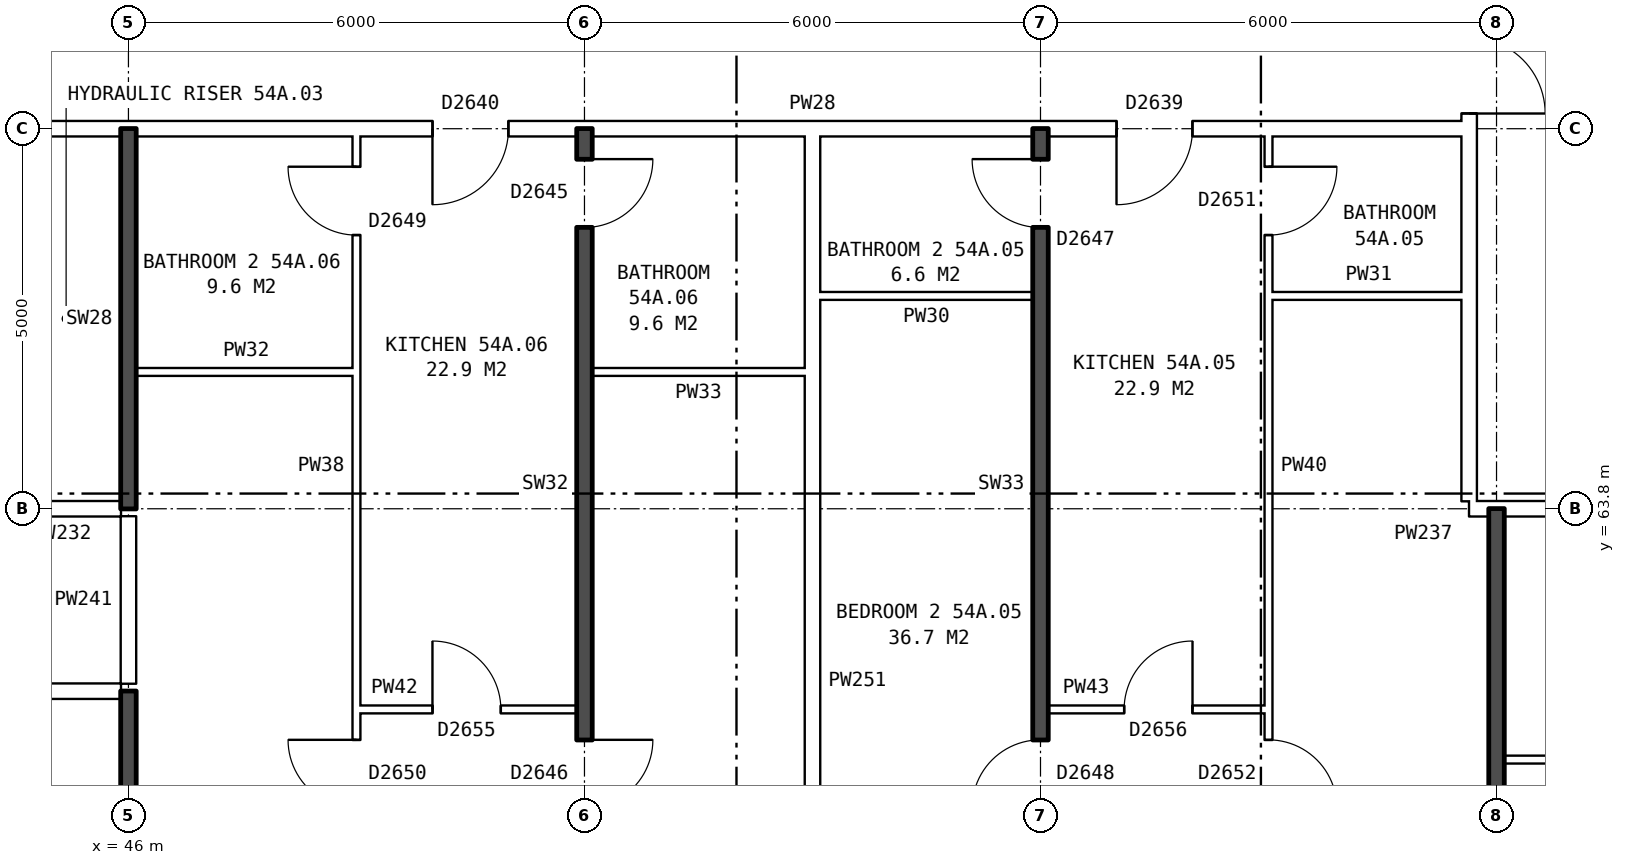
"""IFC4 building model, lengths in metres.
Left out: names, types, materials, properties, quantities, classifications, styles, units other than length and angle.
Written with IfcOpenShell. Run it as: python <this file> out.ifc"""

import sys

from ifc_helpers import new_model, si_unit, direction, frame, frame_2d, origin, place, context, subcontext, project, spatial, rectangle, extrude, element, fill, save


model = new_model("IFC4")
c1 = context("Model", 3, precision=1e-05, world=origin(), true_north=direction((0.0, 1.0)))
c2 = subcontext(c1, "Body", "Model", "MODEL_VIEW")
j1 = project(units=[si_unit("LENGTHUNIT", "METRE"), si_unit("PLANEANGLEUNIT", "RADIAN")], contexts=[c1])
p1 = place(None, origin())
s1 = spatial("IfcSite", under=j1, at=p1, CompositionType="ELEMENT")
p2 = place(p1, origin())
s2 = spatial("IfcBuilding", under=s1, at=p2, CompositionType="ELEMENT")
p3 = place(p2, frame((0.0, 0.0, 191.3)))
s3 = spatial("IfcBuildingStorey", under=s2, at=p3, CompositionType="ELEMENT", Elevation=191.3)
p4 = place(p3, frame((63.64, 63.9, 0.0), z_axis=(0.0, 0.0, 1.0), x_axis=(0.0, 1.0, 0.0)))
e1 = element("IfcWall", 1, at=p4, inside=s3, PredefinedType="PARTITIONING", context=c2, shape_type="SweptSolid", body=[
    extrude(rectangle(XDim=12.2, YDim=0.2, at=frame_2d((6.1, 0.0))), origin(), (0.0, 0.0, 1.0), 2.85),
])
p5 = place(p4, frame((5.1, 0.0, 0.0)))
e2 = element("IfcOpeningElement", 2, at=p5, cuts=e1, PredefinedType="OPENING", context=c2, shape_type="SweptSolid", body=[
    extrude(rectangle(XDim=2.0, YDim=2.1, at=frame_2d((1.0, 1.05))), frame((0.0, 0.11, 0.0), z_axis=(0.0, -1.0, 0.0), x_axis=(1.0, 0.0, 0.0)), (0.0, 0.0, 1.0), 0.22),
])
p6 = place(p3, frame((64.1, 60.5, 0.0), z_axis=(0.0, 0.0, 1.0), x_axis=(1.0, 0.0, 0.0)))
e3 = element("IfcWall", 3, at=p6, inside=s3, PredefinedType="PARTITIONING", context=c2, shape_type="SweptSolid", body=[
    extrude(rectangle(XDim=5.8, YDim=0.1, at=frame_2d((2.9, 0.0))), origin(), (0.0, 0.0, 1.0), 2.85),
])
p7 = place(p6, frame((3.6, 0.0, 0.0)))
e4 = element("IfcOpeningElement", 4, at=p7, cuts=e3, PredefinedType="OPENING", context=c2, shape_type="SweptSolid", body=[
    extrude(rectangle(XDim=0.9, YDim=2.1, at=frame_2d((0.45, 1.05))), frame((0.0, 0.06, 0.0), z_axis=(0.0, -1.0, 0.0), x_axis=(1.0, 0.0, 0.0)), (0.0, 0.0, 1.0), 0.12),
])
p8 = place(p6, frame((0.7, 0.0, 0.0)))
e5 = element("IfcOpeningElement", 5, at=p8, cuts=e3, PredefinedType="OPENING", context=c2, shape_type="SweptSolid", body=[
    extrude(rectangle(XDim=0.9, YDim=2.1, at=frame_2d((0.45, 1.05))), frame((0.0, 0.06, 0.0), z_axis=(0.0, -1.0, 0.0), x_axis=(1.0, 0.0, 0.0)), (0.0, 0.0, 1.0), 0.12),
])
p9 = place(p3, frame((49.0, 61.16, 0.0), z_axis=(0.0, 0.0, 1.0), x_axis=(1.0, 0.0, 0.0)))
e6 = element("IfcWall", 6, at=p9, inside=s3, PredefinedType="PARTITIONING", context=c2, shape_type="SweptSolid", body=[
    extrude(rectangle(XDim=2.9, YDim=0.1, at=frame_2d((1.45, 0.0))), origin(), (0.0, 0.0, 1.0), 2.85),
])
p10 = place(p9, frame((1.0, 0.0, 0.0)))
e7 = element("IfcOpeningElement", 7, at=p10, cuts=e6, PredefinedType="OPENING", context=c2, shape_type="SweptSolid", body=[
    extrude(rectangle(XDim=0.9, YDim=2.1, at=frame_2d((0.45, 1.05))), frame((0.0, 0.06, 0.0), z_axis=(0.0, -1.0, 0.0), x_axis=(1.0, 0.0, 0.0)), (0.0, 0.0, 1.0), 0.12),
])
p11 = place(p3, frame((58.1, 61.16, 0.0), z_axis=(0.0, 0.0, 1.0), x_axis=(1.0, 0.0, 0.0)))
e8 = element("IfcWall", 8, at=p11, inside=s3, PredefinedType="PARTITIONING", context=c2, shape_type="SweptSolid", body=[
    extrude(rectangle(XDim=2.9, YDim=0.1, at=frame_2d((1.45, 0.0))), origin(), (0.0, 0.0, 1.0), 2.85),
])
p12 = place(p11, frame((1.0, 0.0, 0.0)))
e9 = element("IfcOpeningElement", 9, at=p12, cuts=e8, PredefinedType="OPENING", context=c2, shape_type="SweptSolid", body=[
    extrude(rectangle(XDim=0.9, YDim=2.1, at=frame_2d((0.45, 1.05))), frame((0.0, 0.06, 0.0), z_axis=(0.0, -1.0, 0.0), x_axis=(1.0, 0.0, 0.0)), (0.0, 0.0, 1.0), 0.12),
])
p13 = place(p3, frame((30.61, 61.4, 0.0), z_axis=(0.0, 0.0, 1.0), x_axis=(1.0, 0.0, 0.0)))
e10 = element("IfcWall", 10, at=p13, inside=s3, PredefinedType="PARTITIONING", context=c2, shape_type="SweptSolid", body=[
    extrude(rectangle(XDim=15.29, YDim=0.2, at=frame_2d((7.645, 0.0))), origin(), (0.0, 0.0, 1.0), 2.85),
])
p14 = place(p13, frame((10.69, 0.0, 0.0)))
e11 = element("IfcOpeningElement", 11, at=p14, cuts=e10, PredefinedType="OPENING", context=c2, shape_type="SweptSolid", body=[
    extrude(rectangle(XDim=1.0, YDim=2.1, at=frame_2d((0.5, 1.05))), frame((0.0, 0.11, 0.0), z_axis=(0.0, -1.0, 0.0), x_axis=(1.0, 0.0, 0.0)), (0.0, 0.0, 1.0), 0.22),
])
p15 = place(p13, frame((5.89, 0.0, 0.0)))
e12 = element("IfcOpeningElement", 12, at=p15, cuts=e10, PredefinedType="OPENING", context=c2, shape_type="SweptSolid", body=[
    extrude(rectangle(XDim=1.0, YDim=2.1, at=frame_2d((0.5, 1.05))), frame((0.0, 0.11, 0.0), z_axis=(0.0, -1.0, 0.0), x_axis=(1.0, 0.0, 0.0)), (0.0, 0.0, 1.0), 0.22),
])
p16 = place(p3, frame((44.36, 63.8, 0.0), z_axis=(0.0, 0.0, 1.0), x_axis=(1.0, 0.0, 0.0)))
e13 = element("IfcWall", 13, at=p16, inside=s3, PredefinedType="PARTITIONING", context=c2, shape_type="SweptSolid", body=[
    extrude(rectangle(XDim=1.54, YDim=0.2, at=frame_2d((0.77, 0.0))), origin(), (0.0, 0.0, 1.0), 2.85),
])
p17 = place(p3, frame((63.64, 63.8, 0.0), z_axis=(0.0, 0.0, 1.0), x_axis=(1.0, 0.0, 0.0)))
e14 = element("IfcWall", 14, at=p17, inside=s3, PredefinedType="PARTITIONING", context=c2, shape_type="SweptSolid", body=[
    extrude(rectangle(XDim=3.0, YDim=0.2, at=frame_2d((1.5, 0.0))), origin(), (0.0, 0.0, 1.0), 2.85),
])
p18 = place(p17, frame((1.18, 0.0, 0.0)))
e15 = element("IfcOpeningElement", 15, at=p18, cuts=e14, PredefinedType="OPENING", context=c2, shape_type="SweptSolid", body=[
    extrude(rectangle(XDim=1.0, YDim=2.1, at=frame_2d((0.5, 1.05))), frame((0.0, 0.11, 0.0), z_axis=(0.0, -1.0, 0.0), x_axis=(1.0, 0.0, 0.0)), (0.0, 0.0, 1.0), 0.22),
])
p19 = place(p3, frame((46.1, 65.6, 0.0), z_axis=(0.0, 0.0, 1.0), x_axis=(1.0, 0.0, 0.0)))
e16 = element("IfcWall", 16, at=p19, inside=s3, PredefinedType="PARTITIONING", context=c2, shape_type="SweptSolid", body=[
    extrude(rectangle(XDim=2.9, YDim=0.1, at=frame_2d((1.45, 0.0))), origin(), (0.0, 0.0, 1.0), 2.85),
])
for number, where, z_axis, x_axis in (
    (17, (52.1, 65.6, 0.0), (0.0, 0.0, 1.0), (1.0, 0.0, 0.0)),
    (18, (55.1, 66.6, 0.0), (0.0, 0.0, 1.0), (1.0, 0.0, 0.0)),
):
    element("IfcWall", number, at=place(p3, frame(where, z_axis=z_axis, x_axis=x_axis)), inside=s3, PredefinedType="PARTITIONING", context=c2, shape_type="SweptSolid", body=[
        extrude(rectangle(XDim=2.8, YDim=0.1, at=frame_2d((1.4, 0.0))), origin(), (0.0, 0.0, 1.0), 2.85),
    ])
p20 = place(p3, frame((61.0, 66.6, 0.0), z_axis=(0.0, 0.0, 1.0), x_axis=(1.0, 0.0, 0.0)))
e19 = element("IfcWall", 19, at=p20, inside=s3, PredefinedType="PARTITIONING", context=c2, shape_type="SweptSolid", body=[
    extrude(rectangle(XDim=2.64, YDim=0.1, at=frame_2d((1.32, 0.0))), origin(), (0.0, 0.0, 1.0), 2.85),
])
p21 = place(p3, frame((44.36, 68.8, 0.0), z_axis=(0.0, 0.0, 1.0), x_axis=(1.0, 0.0, 0.0)))
e20 = element("IfcWall", 20, at=p21, inside=s3, PredefinedType="PARTITIONING", context=c2, shape_type="SweptSolid", body=[
    extrude(rectangle(XDim=19.28, YDim=0.2, at=frame_2d((9.64, 0.0))), origin(), (0.0, 0.0, 1.0), 2.85),
])
p22 = place(p21, frame((14.64, 0.0, 0.0)))
e21 = element("IfcOpeningElement", 21, at=p22, cuts=e20, PredefinedType="OPENING", context=c2, shape_type="SweptSolid", body=[
    extrude(rectangle(XDim=1.0, YDim=2.1, at=frame_2d((0.5, 1.05))), frame((0.0, 0.11, 0.0), z_axis=(0.0, -1.0, 0.0), x_axis=(1.0, 0.0, 0.0)), (0.0, 0.0, 1.0), 0.22),
])
p23 = place(p21, frame((5.64, 0.0, 0.0)))
e22 = element("IfcOpeningElement", 22, at=p23, cuts=e20, PredefinedType="OPENING", context=c2, shape_type="SweptSolid", body=[
    extrude(rectangle(XDim=1.0, YDim=2.1, at=frame_2d((0.5, 1.05))), frame((0.0, 0.11, 0.0), z_axis=(0.0, -1.0, 0.0), x_axis=(1.0, 0.0, 0.0)), (0.0, 0.0, 1.0), 0.22),
])
p24 = place(p3, frame((46.0, 54.36, 0.0), z_axis=(0.0, 0.0, 1.0), x_axis=(0.0, 1.0, 0.0)))
e23 = element("IfcWall", 23, at=p24, inside=s3, PredefinedType="SOLIDWALL", context=c2, shape_type="SweptSolid", body=[
    extrude(rectangle(XDim=7.04, YDim=0.2, at=frame_2d((3.52, 0.0))), origin(), (0.0, 0.0, 1.0), 2.85),
])
p25 = place(p3, frame((46.0, 61.5, 0.0), z_axis=(0.0, 0.0, 1.0), x_axis=(0.0, 1.0, 0.0)))
e24 = element("IfcWall", 24, at=p25, inside=s3, PredefinedType="PARTITIONING", context=c2, shape_type="SweptSolid", body=[
    extrude(rectangle(XDim=2.2, YDim=0.2, at=frame_2d((1.1, 0.0))), origin(), (0.0, 0.0, 1.0), 2.85),
])
p26 = place(p3, frame((46.0, 63.8, 0.0), z_axis=(0.0, 0.0, 1.0), x_axis=(0.0, 1.0, 0.0)))
e25 = element("IfcWall", 25, at=p26, inside=s3, PredefinedType="SOLIDWALL", context=c2, shape_type="SweptSolid", body=[
    extrude(rectangle(XDim=5.0, YDim=0.2, at=frame_2d((2.5, 0.0))), origin(), (0.0, 0.0, 1.0), 2.85),
])
p27 = place(p3, frame((49.0, 54.36, 0.0), z_axis=(0.0, 0.0, 1.0), x_axis=(0.0, 1.0, 0.0)))
e26 = element("IfcWall", 26, at=p27, inside=s3, PredefinedType="PARTITIONING", context=c2, shape_type="SweptSolid", body=[
    extrude(rectangle(XDim=14.34, YDim=0.1, at=frame_2d((7.17, 0.0))), origin(), (0.0, 0.0, 1.0), 2.85),
])
p28 = place(p27, frame((5.5, 0.0, 0.0)))
e27 = element("IfcOpeningElement", 27, at=p28, cuts=e26, PredefinedType="OPENING", context=c2, shape_type="SweptSolid", body=[
    extrude(rectangle(XDim=0.9, YDim=2.1, at=frame_2d((0.45, 1.05))), frame((0.0, 0.06, 0.0), z_axis=(0.0, -1.0, 0.0), x_axis=(1.0, 0.0, 0.0)), (0.0, 0.0, 1.0), 0.12),
])
p29 = place(p27, frame((13.04, 0.0, 0.0)))
e28 = element("IfcOpeningElement", 28, at=p29, cuts=e26, PredefinedType="OPENING", context=c2, shape_type="SweptSolid", body=[
    extrude(rectangle(XDim=0.9, YDim=2.1, at=frame_2d((0.45, 1.05))), frame((0.0, 0.06, 0.0), z_axis=(0.0, -1.0, 0.0), x_axis=(1.0, 0.0, 0.0)), (0.0, 0.0, 1.0), 0.12),
])
p30 = place(p3, frame((52.0, 54.36, 0.0), z_axis=(0.0, 0.0, 1.0), x_axis=(0.0, 1.0, 0.0)))
e29 = element("IfcWall", 29, at=p30, inside=s3, PredefinedType="SOLIDWALL", context=c2, shape_type="SweptSolid", body=[
    extrude(rectangle(XDim=14.44, YDim=0.2, at=frame_2d((7.22, 0.0))), origin(), (0.0, 0.0, 1.0), 2.85),
])
p31 = place(p30, frame((5.5, 0.0, 0.0)))
e30 = element("IfcOpeningElement", 30, at=p31, cuts=e29, PredefinedType="OPENING", context=c2, shape_type="SweptSolid", body=[
    extrude(rectangle(XDim=0.9, YDim=2.1, at=frame_2d((0.45, 1.05))), frame((0.0, 0.11, 0.0), z_axis=(0.0, -1.0, 0.0), x_axis=(1.0, 0.0, 0.0)), (0.0, 0.0, 1.0), 0.22),
])
p32 = place(p30, frame((13.14, 0.0, 0.0)))
e31 = element("IfcOpeningElement", 31, at=p32, cuts=e29, PredefinedType="OPENING", context=c2, shape_type="SweptSolid", body=[
    extrude(rectangle(XDim=0.9, YDim=2.1, at=frame_2d((0.45, 1.05))), frame((0.0, 0.11, 0.0), z_axis=(0.0, -1.0, 0.0), x_axis=(1.0, 0.0, 0.0)), (0.0, 0.0, 1.0), 0.22),
])
p33 = place(p3, frame((55.0, 54.36, 0.0), z_axis=(0.0, 0.0, 1.0), x_axis=(0.0, 1.0, 0.0)))
e32 = element("IfcWall", 32, at=p33, inside=s3, PredefinedType="PARTITIONING", context=c2, shape_type="SweptSolid", body=[
    extrude(rectangle(XDim=14.34, YDim=0.2, at=frame_2d((7.17, 0.0))), origin(), (0.0, 0.0, 1.0), 2.85),
])
p34 = place(p3, frame((58.0, 54.36, 0.0), z_axis=(0.0, 0.0, 1.0), x_axis=(0.0, 1.0, 0.0)))
e33 = element("IfcWall", 33, at=p34, inside=s3, PredefinedType="SOLIDWALL", context=c2, shape_type="SweptSolid", body=[
    extrude(rectangle(XDim=14.44, YDim=0.2, at=frame_2d((7.22, 0.0))), origin(), (0.0, 0.0, 1.0), 2.85),
])
p35 = place(p34, frame((5.5, 0.0, 0.0)))
e34 = element("IfcOpeningElement", 34, at=p35, cuts=e33, PredefinedType="OPENING", context=c2, shape_type="SweptSolid", body=[
    extrude(rectangle(XDim=0.9, YDim=2.1, at=frame_2d((0.45, 1.05))), frame((0.0, 0.11, 0.0), z_axis=(0.0, -1.0, 0.0), x_axis=(1.0, 0.0, 0.0)), (0.0, 0.0, 1.0), 0.22),
])
p36 = place(p34, frame((13.14, 0.0, 0.0)))
e35 = element("IfcOpeningElement", 35, at=p36, cuts=e33, PredefinedType="OPENING", context=c2, shape_type="SweptSolid", body=[
    extrude(rectangle(XDim=0.9, YDim=2.1, at=frame_2d((0.45, 1.05))), frame((0.0, 0.11, 0.0), z_axis=(0.0, -1.0, 0.0), x_axis=(1.0, 0.0, 0.0)), (0.0, 0.0, 1.0), 0.22),
])
p37 = place(p3, frame((61.0, 54.36, 0.0), z_axis=(0.0, 0.0, 1.0), x_axis=(0.0, 1.0, 0.0)))
e36 = element("IfcWall", 36, at=p37, inside=s3, PredefinedType="PARTITIONING", context=c2, shape_type="SweptSolid", body=[
    extrude(rectangle(XDim=14.34, YDim=0.1, at=frame_2d((7.17, 0.0))), origin(), (0.0, 0.0, 1.0), 2.85),
])
p38 = place(p37, frame((5.5, 0.0, 0.0)))
e37 = element("IfcOpeningElement", 37, at=p38, cuts=e36, PredefinedType="OPENING", context=c2, shape_type="SweptSolid", body=[
    extrude(rectangle(XDim=0.9, YDim=2.1, at=frame_2d((0.45, 1.05))), frame((0.0, 0.06, 0.0), z_axis=(0.0, -1.0, 0.0), x_axis=(1.0, 0.0, 0.0)), (0.0, 0.0, 1.0), 0.12),
])
p39 = place(p37, frame((13.04, 0.0, 0.0)))
e38 = element("IfcOpeningElement", 38, at=p39, cuts=e36, PredefinedType="OPENING", context=c2, shape_type="SweptSolid", body=[
    extrude(rectangle(XDim=0.9, YDim=2.1, at=frame_2d((0.45, 1.05))), frame((0.0, 0.06, 0.0), z_axis=(0.0, -1.0, 0.0), x_axis=(1.0, 0.0, 0.0)), (0.0, 0.0, 1.0), 0.12),
])
p40 = place(p3, frame((64.0, 54.36, 0.0), z_axis=(0.0, 0.0, 1.0), x_axis=(0.0, 1.0, 0.0)))
e39 = element("IfcWall", 39, at=p40, inside=s3, PredefinedType="SOLIDWALL", context=c2, shape_type="SweptSolid", body=[
    extrude(rectangle(XDim=9.44, YDim=0.2, at=frame_2d((4.72, 0.0))), origin(), (0.0, 0.0, 1.0), 2.85),
])
p41 = place(p5, frame((2.0, 0.0, 0.0), z_axis=(0.0, 0.0, 1.0), x_axis=(-1.0, 0.0, 0.0)))
e40 = element("IfcDoor", 40, at=p41, inside=s3, OperationType="DOUBLE_DOOR_SINGLE_SWING", PredefinedType="DOOR", context=c2, shape_type="SweptSolid", body=[
    extrude(rectangle(XDim=2.0, YDim=2.1, at=frame_2d((1.0, 1.05))), frame((0.0, 0.025, 0.0), z_axis=(0.0, -1.0, 0.0), x_axis=(1.0, 0.0, 0.0)), (0.0, 0.0, 1.0), 0.05),
])
fill(e2, e40)
p42 = place(p38, frame((0.9, 0.0, 0.0), z_axis=(0.0, 0.0, 1.0), x_axis=(-1.0, 0.0, 0.0)))
e41 = element("IfcDoor", 41, at=p42, inside=s3, OperationType="SINGLE_SWING_RIGHT", PredefinedType="DOOR", context=c2, shape_type="SweptSolid", body=[
    extrude(rectangle(XDim=0.9, YDim=2.1, at=frame_2d((0.45, 1.05))), frame((0.0, 0.025, 0.0), z_axis=(0.0, -1.0, 0.0), x_axis=(1.0, 0.0, 0.0)), (0.0, 0.0, 1.0), 0.05),
])
fill(e37, e41)
p43 = place(p35, origin())
e42 = element("IfcDoor", 42, at=p43, inside=s3, OperationType="SINGLE_SWING_LEFT", PredefinedType="DOOR", context=c2, shape_type="SweptSolid", body=[
    extrude(rectangle(XDim=0.9, YDim=2.1, at=frame_2d((0.45, 1.05))), frame((0.0, 0.025, 0.0), z_axis=(0.0, -1.0, 0.0), x_axis=(1.0, 0.0, 0.0)), (0.0, 0.0, 1.0), 0.05),
])
fill(e34, e42)
p44 = place(p22, frame((1.0, 0.0, 0.0), z_axis=(0.0, 0.0, 1.0), x_axis=(-1.0, 0.0, 0.0)))
e43 = element("IfcDoor", 43, at=p44, inside=s3, OperationType="SINGLE_SWING_RIGHT", PredefinedType="DOOR", context=c2, shape_type="SweptSolid", body=[
    extrude(rectangle(XDim=1.0, YDim=2.1, at=frame_2d((0.5, 1.05))), frame((0.0, 0.025, 0.0), z_axis=(0.0, -1.0, 0.0), x_axis=(1.0, 0.0, 0.0)), (0.0, 0.0, 1.0), 0.05),
])
fill(e21, e43)
p45 = place(p12, origin())
e44 = element("IfcDoor", 44, at=p45, inside=s3, OperationType="SINGLE_SWING_RIGHT", PredefinedType="DOOR", context=c2, shape_type="SweptSolid", body=[
    extrude(rectangle(XDim=0.9, YDim=2.1, at=frame_2d((0.45, 1.05))), frame((0.0, 0.025, 0.0), z_axis=(0.0, -1.0, 0.0), x_axis=(1.0, 0.0, 0.0)), (0.0, 0.0, 1.0), 0.05),
])
fill(e9, e44)
p46 = place(p39, frame((0.9, 0.0, 0.0), z_axis=(0.0, 0.0, 1.0), x_axis=(-1.0, 0.0, 0.0)))
e45 = element("IfcDoor", 45, at=p46, inside=s3, OperationType="SINGLE_SWING_LEFT", PredefinedType="DOOR", context=c2, shape_type="SweptSolid", body=[
    extrude(rectangle(XDim=0.9, YDim=2.1, at=frame_2d((0.45, 1.05))), frame((0.0, 0.025, 0.0), z_axis=(0.0, -1.0, 0.0), x_axis=(1.0, 0.0, 0.0)), (0.0, 0.0, 1.0), 0.05),
])
fill(e38, e45)
p47 = place(p36, origin())
e46 = element("IfcDoor", 46, at=p47, inside=s3, OperationType="SINGLE_SWING_RIGHT", PredefinedType="DOOR", context=c2, shape_type="SweptSolid", body=[
    extrude(rectangle(XDim=0.9, YDim=2.1, at=frame_2d((0.45, 1.05))), frame((0.0, 0.025, 0.0), z_axis=(0.0, -1.0, 0.0), x_axis=(1.0, 0.0, 0.0)), (0.0, 0.0, 1.0), 0.05),
])
fill(e35, e46)
p48 = place(p31, frame((0.9, 0.0, 0.0), z_axis=(0.0, 0.0, 1.0), x_axis=(-1.0, 0.0, 0.0)))
e47 = element("IfcDoor", 47, at=p48, inside=s3, OperationType="SINGLE_SWING_LEFT", PredefinedType="DOOR", context=c2, shape_type="SweptSolid", body=[
    extrude(rectangle(XDim=0.9, YDim=2.1, at=frame_2d((0.45, 1.05))), frame((0.0, 0.025, 0.0), z_axis=(0.0, -1.0, 0.0), x_axis=(1.0, 0.0, 0.0)), (0.0, 0.0, 1.0), 0.05),
])
fill(e30, e47)
p49 = place(p28, origin())
e48 = element("IfcDoor", 48, at=p49, inside=s3, OperationType="SINGLE_SWING_RIGHT", PredefinedType="DOOR", context=c2, shape_type="SweptSolid", body=[
    extrude(rectangle(XDim=0.9, YDim=2.1, at=frame_2d((0.45, 1.05))), frame((0.0, 0.025, 0.0), z_axis=(0.0, -1.0, 0.0), x_axis=(1.0, 0.0, 0.0)), (0.0, 0.0, 1.0), 0.05),
])
fill(e27, e48)
p50 = place(p23, frame((1.0, 0.0, 0.0), z_axis=(0.0, 0.0, 1.0), x_axis=(-1.0, 0.0, 0.0)))
e49 = element("IfcDoor", 49, at=p50, inside=s3, OperationType="SINGLE_SWING_RIGHT", PredefinedType="DOOR", context=c2, shape_type="SweptSolid", body=[
    extrude(rectangle(XDim=1.0, YDim=2.1, at=frame_2d((0.5, 1.05))), frame((0.0, 0.025, 0.0), z_axis=(0.0, -1.0, 0.0), x_axis=(1.0, 0.0, 0.0)), (0.0, 0.0, 1.0), 0.05),
])
fill(e22, e49)
p51 = place(p10, origin())
e50 = element("IfcDoor", 50, at=p51, inside=s3, OperationType="SINGLE_SWING_LEFT", PredefinedType="DOOR", context=c2, shape_type="SweptSolid", body=[
    extrude(rectangle(XDim=0.9, YDim=2.1, at=frame_2d((0.45, 1.05))), frame((0.0, 0.025, 0.0), z_axis=(0.0, -1.0, 0.0), x_axis=(1.0, 0.0, 0.0)), (0.0, 0.0, 1.0), 0.05),
])
fill(e7, e50)
p52 = place(p32, frame((0.9, 0.0, 0.0), z_axis=(0.0, 0.0, 1.0), x_axis=(-1.0, 0.0, 0.0)))
e51 = element("IfcDoor", 51, at=p52, inside=s3, OperationType="SINGLE_SWING_LEFT", PredefinedType="DOOR", context=c2, shape_type="SweptSolid", body=[
    extrude(rectangle(XDim=0.9, YDim=2.1, at=frame_2d((0.45, 1.05))), frame((0.0, 0.025, 0.0), z_axis=(0.0, -1.0, 0.0), x_axis=(1.0, 0.0, 0.0)), (0.0, 0.0, 1.0), 0.05),
])
fill(e31, e51)
p53 = place(p29, origin())
e52 = element("IfcDoor", 52, at=p53, inside=s3, OperationType="SINGLE_SWING_RIGHT", PredefinedType="DOOR", context=c2, shape_type="SweptSolid", body=[
    extrude(rectangle(XDim=0.9, YDim=2.1, at=frame_2d((0.45, 1.05))), frame((0.0, 0.025, 0.0), z_axis=(0.0, -1.0, 0.0), x_axis=(1.0, 0.0, 0.0)), (0.0, 0.0, 1.0), 0.05),
])
fill(e28, e52)
save(model, sys.argv[1])
